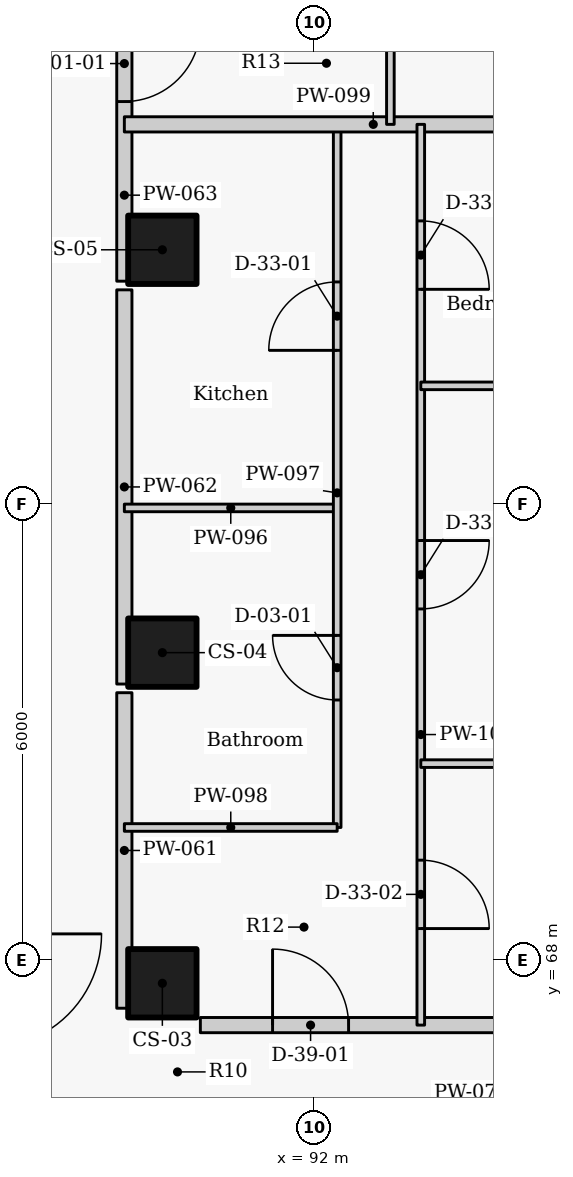
"""IFC4 building model, lengths in metres.
Left out: names, types, materials, properties, quantities, classifications, styles, units other than length and angle.
Written with IfcOpenShell. Run it as: python <this file> out.ifc"""

import sys

from ifc_helpers import new_model, si_unit, direction, frame, frame_2d, origin, origin_2d, place, context, subcontext, project, spatial, rectangle, extrude, element, fill, save


model = new_model("IFC4")
c1 = context("Model", 3, precision=1e-05, world=origin(), true_north=direction((0.0, 1.0)))
c2 = subcontext(c1, "Body", "Model", "MODEL_VIEW")
j1 = project(units=[si_unit("LENGTHUNIT", "METRE"), si_unit("PLANEANGLEUNIT", "RADIAN")], contexts=[c1])
p1 = place(None, origin())
s1 = spatial("IfcSite", under=j1, at=p1, CompositionType="ELEMENT")
p2 = place(p1, origin())
s2 = spatial("IfcBuilding", under=s1, at=p2, CompositionType="ELEMENT")
p3 = place(p2, frame((0.0, 0.0, 269.1)))
s3 = spatial("IfcBuildingStorey", under=s2, at=p3, CompositionType="ELEMENT", Elevation=269.1)
for number, where, z_axis, x_axis in (
    (1, (90.0, 67.7, 0.0), (0.0, 0.0, 1.0), (0.0, 1.0, 0.0)),
    (2, (90.0, 72.05, 0.0), (0.0, 0.0, 1.0), (0.0, 1.0, 0.0)),
    (3, (90.0, 77.35, 0.0), (0.0, 0.0, 1.0), (0.0, 1.0, 0.0)),
):
    element("IfcColumn", number, at=place(p3, frame(where, z_axis=z_axis, x_axis=x_axis)), inside=s3, PredefinedType="COLUMN", context=c2, shape_type="SweptSolid", body=[
        extrude(rectangle(XDim=0.9, YDim=0.9, at=origin_2d()), origin(), (0.0, 0.0, 1.0), 3.3),
    ])
p4 = place(p3, frame((89.5, 67.372, 0.0), z_axis=(0.0, 0.0, 1.0), x_axis=(0.0, 1.0, 0.0)))
e4 = element("IfcWall", 4, at=p4, inside=s3, PredefinedType="PARTITIONING", context=c2, shape_type="SweptSolid", body=[
    extrude(rectangle(XDim=4.151, YDim=0.2, at=frame_2d((2.075, 0.0))), origin(), (0.0, 0.0, 1.0), 3.025),
])
p5 = place(p3, frame((89.5, 71.637, 0.0), z_axis=(0.0, 0.0, 1.0), x_axis=(0.0, 1.0, 0.0)))
e5 = element("IfcWall", 5, at=p5, inside=s3, PredefinedType="PARTITIONING", context=c2, shape_type="SweptSolid", body=[
    extrude(rectangle(XDim=5.186, YDim=0.2, at=frame_2d((2.593, 0.0))), origin(), (0.0, 0.0, 1.0), 3.025),
])
p6 = place(p3, frame((89.5, 82.123, 0.0), z_axis=(0.0, 0.0, 1.0), x_axis=(0.0, -1.0, 0.0)))
e6 = element("IfcWall", 6, at=p6, inside=s3, PredefinedType="PARTITIONING", context=c2, shape_type="SweptSolid", body=[
    extrude(rectangle(XDim=5.186, YDim=0.2, at=frame_2d((2.593, 0.0))), origin(), (0.0, 0.0, 1.0), 3.025),
])
p7 = place(p6, frame((1.823, 0.0, 0.0)))
e7 = element("IfcOpeningElement", 7, at=p7, cuts=e6, PredefinedType="OPENING", context=c2, shape_type="SweptSolid", body=[
    extrude(rectangle(XDim=1.0, YDim=2.1, at=frame_2d((0.5, 1.05))), frame((0.0, 0.11, 0.0), z_axis=(0.0, -1.0, 0.0), x_axis=(1.0, 0.0, 0.0)), (0.0, 0.0, 1.0), 0.22),
])
p8 = place(p3, frame((90.5, 67.15, 0.0), z_axis=(0.0, 0.0, 1.0), x_axis=(1.0, 0.0, 0.0)))
e8 = element("IfcWall", 8, at=p8, inside=s3, PredefinedType="PARTITIONING", context=c2, shape_type="SweptSolid", body=[
    extrude(rectangle(XDim=7.889, YDim=0.2, at=frame_2d((3.944, 0.0))), origin(), (0.0, 0.0, 1.0), 2.105),
])
p9 = place(p8, frame((0.95, 0.0, 0.0)))
e9 = element("IfcOpeningElement", 9, at=p9, cuts=e8, PredefinedType="OPENING", context=c2, shape_type="SweptSolid", body=[
    extrude(rectangle(XDim=1.0, YDim=2.085, at=frame_2d((0.5, 1.042))), frame((0.0, 0.11, 0.0), z_axis=(0.0, -1.0, 0.0), x_axis=(1.0, 0.0, 0.0)), (0.0, 0.0, 1.0), 0.22),
])
p10 = place(p3, frame((89.5, 73.954, 0.0), z_axis=(0.0, 0.0, 1.0), x_axis=(1.0, 0.0, 0.0)))
e10 = element("IfcWall", 10, at=p10, inside=s3, PredefinedType="PARTITIONING", context=c2, shape_type="SweptSolid", body=[
    extrude(rectangle(XDim=2.8, YDim=0.1, at=frame_2d((1.4, 0.0))), origin(), (0.0, 0.0, 1.0), 2.505),
])
p11 = place(p3, frame((92.3, 69.75, 0.0), z_axis=(0.0, 0.0, 1.0), x_axis=(0.0, 1.0, 0.0)))
e11 = element("IfcWall", 11, at=p11, inside=s3, PredefinedType="PARTITIONING", context=c2, shape_type="SweptSolid", body=[
    extrude(rectangle(XDim=9.25, YDim=0.1, at=frame_2d((4.625, 0.0))), origin(), (0.0, 0.0, 1.0), 3.025),
])
p12 = place(p11, frame((1.677, 0.0, 0.0)))
e12 = element("IfcOpeningElement", 12, at=p12, cuts=e11, PredefinedType="OPENING", context=c2, shape_type="SweptSolid", body=[
    extrude(rectangle(XDim=0.85, YDim=2.1, at=frame_2d((0.425, 1.05))), frame((0.0, 0.06, 0.0), z_axis=(0.0, -1.0, 0.0), x_axis=(1.0, 0.0, 0.0)), (0.0, 0.0, 1.0), 0.12),
])
p13 = place(p11, frame((6.277, 0.0, 0.0)))
e13 = element("IfcOpeningElement", 13, at=p13, cuts=e11, PredefinedType="OPENING", context=c2, shape_type="SweptSolid", body=[
    extrude(rectangle(XDim=0.9, YDim=2.1, at=frame_2d((0.45, 1.05))), frame((0.0, 0.06, 0.0), z_axis=(0.0, -1.0, 0.0), x_axis=(1.0, 0.0, 0.0)), (0.0, 0.0, 1.0), 0.12),
])
p14 = place(p3, frame((89.5, 69.75, 0.0), z_axis=(0.0, 0.0, 1.0), x_axis=(1.0, 0.0, 0.0)))
e14 = element("IfcWall", 14, at=p14, inside=s3, PredefinedType="PARTITIONING", context=c2, shape_type="SweptSolid", body=[
    extrude(rectangle(XDim=2.8, YDim=0.1, at=frame_2d((1.4, 0.0))), origin(), (0.0, 0.0, 1.0), 2.505),
])
p15 = place(p3, frame((89.5, 79.0, 0.0), z_axis=(0.0, 0.0, 1.0), x_axis=(1.0, 0.0, 0.0)))
e15 = element("IfcWall", 15, at=p15, inside=s3, PredefinedType="PARTITIONING", context=c2, shape_type="SweptSolid", body=[
    extrude(rectangle(XDim=6.55, YDim=0.2, at=frame_2d((3.275, 0.0))), origin(), (0.0, 0.0, 1.0), 2.105),
])
p16 = place(p3, frame((93.4, 79.0, 0.0), z_axis=(0.0, 0.0, 1.0), x_axis=(0.0, -1.0, 0.0)))
e16 = element("IfcWall", 16, at=p16, inside=s3, PredefinedType="PARTITIONING", context=c2, shape_type="SweptSolid", body=[
    extrude(rectangle(XDim=11.85, YDim=0.1, at=frame_2d((5.925, 0.0))), origin(), (0.0, 0.0, 1.0), 3.025),
])
p17 = place(p16, frame((9.68, 0.0, 0.0)))
e17 = element("IfcOpeningElement", 17, at=p17, cuts=e16, PredefinedType="OPENING", context=c2, shape_type="SweptSolid", body=[
    extrude(rectangle(XDim=0.9, YDim=2.1, at=frame_2d((0.45, 1.05))), frame((0.0, 0.06, 0.0), z_axis=(0.0, -1.0, 0.0), x_axis=(1.0, 0.0, 0.0)), (0.0, 0.0, 1.0), 0.12),
])
p18 = place(p16, frame((5.475, 0.0, 0.0)))
e18 = element("IfcOpeningElement", 18, at=p18, cuts=e16, PredefinedType="OPENING", context=c2, shape_type="SweptSolid", body=[
    extrude(rectangle(XDim=0.9, YDim=2.1, at=frame_2d((0.45, 1.05))), frame((0.0, 0.06, 0.0), z_axis=(0.0, -1.0, 0.0), x_axis=(1.0, 0.0, 0.0)), (0.0, 0.0, 1.0), 0.12),
])
p19 = place(p16, frame((1.27, 0.0, 0.0)))
e19 = element("IfcOpeningElement", 19, at=p19, cuts=e16, PredefinedType="OPENING", context=c2, shape_type="SweptSolid", body=[
    extrude(rectangle(XDim=0.9, YDim=2.1, at=frame_2d((0.45, 1.05))), frame((0.0, 0.06, 0.0), z_axis=(0.0, -1.0, 0.0), x_axis=(1.0, 0.0, 0.0)), (0.0, 0.0, 1.0), 0.12),
])
p20 = place(p3, frame((93.4, 70.59, 0.0), z_axis=(0.0, 0.0, 1.0), x_axis=(1.0, 0.0, 0.0)))
e20 = element("IfcWall", 20, at=p20, inside=s3, PredefinedType="PARTITIONING", context=c2, shape_type="SweptSolid", body=[
    extrude(rectangle(XDim=6.975, YDim=0.1, at=frame_2d((3.488, 0.0))), origin(), (0.0, 0.0, 1.0), 2.105),
])
p21 = place(p3, frame((93.4, 75.56, 0.0), z_axis=(0.0, 0.0, 1.0), x_axis=(1.0, 0.0, 0.0)))
e21 = element("IfcWall", 21, at=p21, inside=s3, PredefinedType="PARTITIONING", context=c2, shape_type="SweptSolid", body=[
    extrude(rectangle(XDim=9.844, YDim=0.1, at=frame_2d((4.922, 0.0))), origin(), (0.0, 0.0, 1.0), 2.105),
])
p22 = place(p3, frame((93.0, 89.0, 0.0), z_axis=(0.0, 0.0, 1.0), x_axis=(0.0, -1.0, 0.0)))
e22 = element("IfcWall", 22, at=p22, inside=s3, PredefinedType="PARTITIONING", context=c2, shape_type="SweptSolid", body=[
    extrude(rectangle(XDim=10.0, YDim=0.1, at=frame_2d((5.0, 0.0))), origin(), (0.0, 0.0, 1.0), 3.025),
])
p23 = place(p22, frame((8.098, 0.0, 0.0)))
e23 = element("IfcOpeningElement", 23, at=p23, cuts=e22, PredefinedType="OPENING", context=c2, shape_type="SweptSolid", body=[
    extrude(rectangle(XDim=0.9, YDim=2.1, at=frame_2d((0.45, 1.05))), frame((0.0, 0.06, 0.0), z_axis=(0.0, -1.0, 0.0), x_axis=(1.0, 0.0, 0.0)), (0.0, 0.0, 1.0), 0.12),
])
p24 = place(p22, frame((4.55, 0.0, 0.0)))
e24 = element("IfcOpeningElement", 24, at=p24, cuts=e22, PredefinedType="OPENING", context=c2, shape_type="SweptSolid", body=[
    extrude(rectangle(XDim=0.9, YDim=2.1, at=frame_2d((0.45, 1.05))), frame((0.0, 0.06, 0.0), z_axis=(0.0, -1.0, 0.0), x_axis=(1.0, 0.0, 0.0)), (0.0, 0.0, 1.0), 0.12),
])
p25 = place(p22, frame((1.002, 0.0, 0.0)))
e25 = element("IfcOpeningElement", 25, at=p25, cuts=e22, PredefinedType="OPENING", context=c2, shape_type="SweptSolid", body=[
    extrude(rectangle(XDim=0.9, YDim=2.1, at=frame_2d((0.45, 1.05))), frame((0.0, 0.06, 0.0), z_axis=(0.0, -1.0, 0.0), x_axis=(1.0, 0.0, 0.0)), (0.0, 0.0, 1.0), 0.12),
])
p26 = place(p9, origin())
e26 = element("IfcDoor", 26, at=p26, inside=s3, OperationType="SINGLE_SWING_LEFT", PredefinedType="DOOR", context=c2, shape_type="SweptSolid", body=[
    extrude(rectangle(XDim=1.0, YDim=2.085, at=frame_2d((0.5, 1.042))), frame((0.0, 0.025, 0.0), z_axis=(0.0, -1.0, 0.0), x_axis=(1.0, 0.0, 0.0)), (0.0, 0.0, 1.0), 0.05),
])
fill(e9, e26)
p27 = place(p12, origin())
e27 = element("IfcDoor", 27, at=p27, inside=s3, OperationType="SINGLE_SWING_RIGHT", PredefinedType="DOOR", context=c2, shape_type="SweptSolid", body=[
    extrude(rectangle(XDim=0.85, YDim=2.1, at=frame_2d((0.425, 1.05))), frame((0.0, 0.025, 0.0), z_axis=(0.0, -1.0, 0.0), x_axis=(1.0, 0.0, 0.0)), (0.0, 0.0, 1.0), 0.05),
])
fill(e12, e27)
p28 = place(p13, origin())
e28 = element("IfcDoor", 28, at=p28, inside=s3, OperationType="SINGLE_SWING_LEFT", PredefinedType="DOOR", context=c2, shape_type="SweptSolid", body=[
    extrude(rectangle(XDim=0.9, YDim=2.1, at=frame_2d((0.45, 1.05))), frame((0.0, 0.025, 0.0), z_axis=(0.0, -1.0, 0.0), x_axis=(1.0, 0.0, 0.0)), (0.0, 0.0, 1.0), 0.05),
])
fill(e13, e28)
p29 = place(p17, origin())
e29 = element("IfcDoor", 29, at=p29, inside=s3, OperationType="SINGLE_SWING_RIGHT", PredefinedType="DOOR", context=c2, shape_type="SweptSolid", body=[
    extrude(rectangle(XDim=0.9, YDim=2.1, at=frame_2d((0.45, 1.05))), frame((0.0, 0.025, 0.0), z_axis=(0.0, -1.0, 0.0), x_axis=(1.0, 0.0, 0.0)), (0.0, 0.0, 1.0), 0.05),
])
fill(e17, e29)
p30 = place(p18, origin())
e30 = element("IfcDoor", 30, at=p30, inside=s3, OperationType="SINGLE_SWING_LEFT", PredefinedType="DOOR", context=c2, shape_type="SweptSolid", body=[
    extrude(rectangle(XDim=0.9, YDim=2.1, at=frame_2d((0.45, 1.05))), frame((0.0, 0.025, 0.0), z_axis=(0.0, -1.0, 0.0), x_axis=(1.0, 0.0, 0.0)), (0.0, 0.0, 1.0), 0.05),
])
fill(e18, e30)
p31 = place(p19, origin())
e31 = element("IfcDoor", 31, at=p31, inside=s3, OperationType="SINGLE_SWING_RIGHT", PredefinedType="DOOR", context=c2, shape_type="SweptSolid", body=[
    extrude(rectangle(XDim=0.9, YDim=2.1, at=frame_2d((0.45, 1.05))), frame((0.0, 0.025, 0.0), z_axis=(0.0, -1.0, 0.0), x_axis=(1.0, 0.0, 0.0)), (0.0, 0.0, 1.0), 0.05),
])
fill(e19, e31)
p32 = place(p7, origin())
e32 = element("IfcDoor", 32, at=p32, inside=s3, OperationType="SINGLE_SWING_LEFT", PredefinedType="DOOR", context=c2, shape_type="SweptSolid", body=[
    extrude(rectangle(XDim=1.0, YDim=2.1, at=frame_2d((0.5, 1.05))), frame((0.0, 0.025, 0.0), z_axis=(0.0, -1.0, 0.0), x_axis=(1.0, 0.0, 0.0)), (0.0, 0.0, 1.0), 0.05),
])
fill(e7, e32)
save(model, sys.argv[1])
